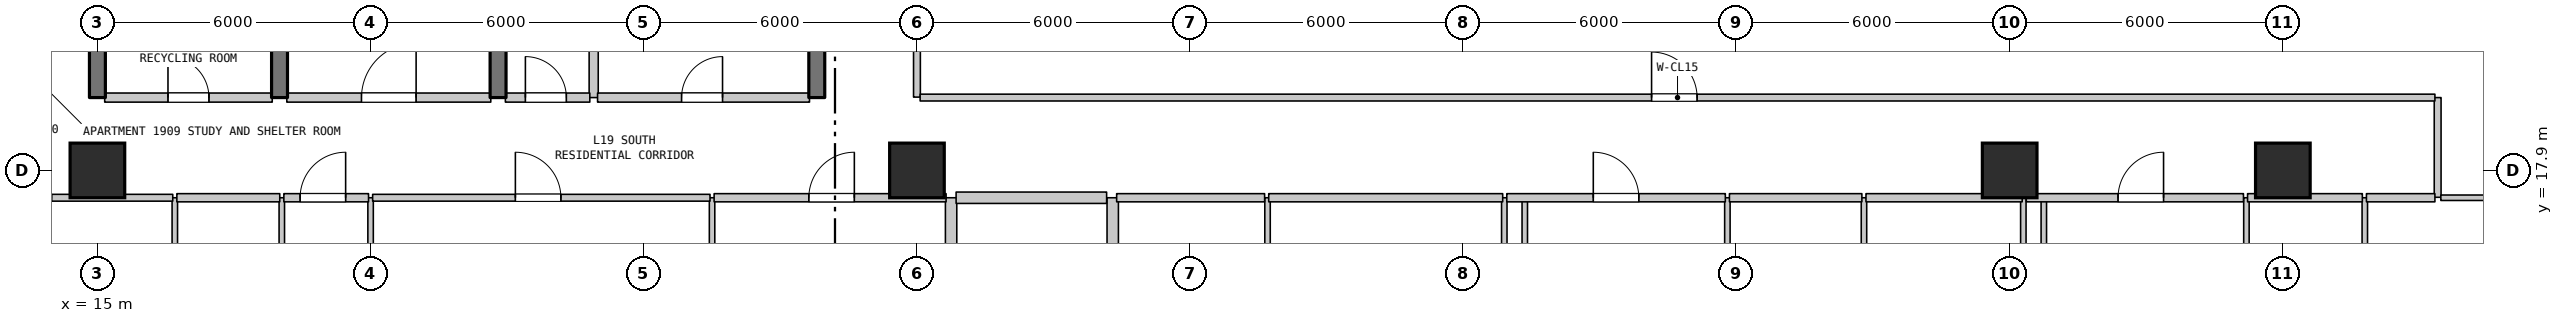
"""IFC4 building model, lengths in metres.
Left out: names, types, materials, properties, quantities, classifications, styles, units other than length and angle.
Written with IfcOpenShell. Run it as: python <this file> out.ifc"""

import sys

from ifc_helpers import new_model, si_unit, direction, frame, frame_2d, origin, origin_2d, place, context, subcontext, project, spatial, rectangle, extrude, element, fill, save


model = new_model("IFC4")
c1 = context("Model", 3, precision=1e-05, world=origin(), true_north=direction((0.0, 1.0)))
c2 = subcontext(c1, "Body", "Model", "MODEL_VIEW")
j1 = project(units=[si_unit("LENGTHUNIT", "METRE"), si_unit("PLANEANGLEUNIT", "RADIAN")], contexts=[c1])
p1 = place(None, origin())
s1 = spatial("IfcSite", under=j1, at=p1, CompositionType="ELEMENT")
p2 = place(p1, origin())
s2 = spatial("IfcBuilding", under=s1, at=p2, CompositionType="ELEMENT")
p3 = place(p2, frame((0.0, 0.0, 81.2)))
s3 = spatial("IfcBuildingStorey", under=s2, at=p3, CompositionType="ELEMENT", Elevation=81.2)
for number, where, z_axis, x_axis in (
    (1, (15.0, 17.9, 0.0), (0.0, 0.0, 1.0), (1.0, 0.0, 0.0)),
    (2, (33.0, 17.9, 0.0), (0.0, 0.0, 1.0), (1.0, 0.0, 0.0)),
    (3, (57.0, 17.9, 0.0), (0.0, 0.0, 1.0), (1.0, 0.0, 0.0)),
    (4, (63.0, 17.9, 0.0), (0.0, 0.0, 1.0), (1.0, 0.0, 0.0)),
):
    element("IfcColumn", number, at=place(p3, frame(where, z_axis=z_axis, x_axis=x_axis)), inside=s3, PredefinedType="COLUMN", context=c2, shape_type="SweptSolid", body=[
        extrude(rectangle(XDim=1.2, YDim=1.2, at=origin_2d()), origin(), (0.0, 0.0, 1.0), 5.2),
    ])
p4 = place(p3, frame((15.0, 19.5, 0.0), z_axis=(0.0, 0.0, 1.0), x_axis=(0.0, 1.0, 0.0)))
e5 = element("IfcWall", 5, at=p4, inside=s3, PredefinedType="SHEAR", context=c2, shape_type="SweptSolid", body=[
    extrude(rectangle(XDim=3.2, YDim=0.35, at=frame_2d((1.6, 0.0))), origin(), (0.0, 0.0, 1.0), 4.885),
])
p5 = place(p3, frame((16.7, 14.1, 0.0), z_axis=(0.0, 0.0, 1.0), x_axis=(0.0, 1.0, 0.0)))
e6 = element("IfcWall", 6, at=p5, inside=s3, PredefinedType="PARTITIONING", context=c2, shape_type="SweptSolid", body=[
    extrude(rectangle(XDim=3.2, YDim=0.12, at=frame_2d((1.6, 0.0))), origin(), (0.0, 0.0, 1.0), 4.885),
])
p6 = place(p3, frame((19.0, 19.5, 0.0), z_axis=(0.0, 0.0, 1.0), x_axis=(0.0, 1.0, 0.0)))
e7 = element("IfcWall", 7, at=p6, inside=s3, PredefinedType="SHEAR", context=c2, shape_type="SweptSolid", body=[
    extrude(rectangle(XDim=3.2, YDim=0.35, at=frame_2d((1.6, 0.0))), origin(), (0.0, 0.0, 1.0), 4.885),
])
p7 = place(p3, frame((19.05, 14.1, 0.0), z_axis=(0.0, 0.0, 1.0), x_axis=(0.0, 1.0, 0.0)))
e8 = element("IfcWall", 8, at=p7, inside=s3, PredefinedType="PARTITIONING", context=c2, shape_type="SweptSolid", body=[
    extrude(rectangle(XDim=3.2, YDim=0.12, at=frame_2d((1.6, 0.0))), origin(), (0.0, 0.0, 1.0), 4.885),
])
p8 = place(p7, frame((1.15, 0.0, 0.0)))
e9 = element("IfcOpeningElement", 9, at=p8, cuts=e8, PredefinedType="OPENING", context=c2, shape_type="SweptSolid", body=[
    extrude(rectangle(XDim=0.9, YDim=2.15, at=frame_2d((0.45, 1.075))), frame((0.0, 0.07, 0.0), z_axis=(0.0, -1.0, 0.0), x_axis=(1.0, 0.0, 0.0)), (0.0, 0.0, 1.0), 0.14),
])
p9 = place(p3, frame((21.0, 7.931, 0.0), z_axis=(0.0, 0.0, 1.0), x_axis=(0.0, 1.0, 0.0)))
e10 = element("IfcWall", 10, at=p9, inside=s3, PredefinedType="PARTITIONING", context=c2, shape_type="SweptSolid", body=[
    extrude(rectangle(XDim=9.369, YDim=0.12, at=frame_2d((4.685, 0.0))), origin(), (0.0, 0.0, 1.0), 4.885),
])
p10 = place(p3, frame((23.8, 19.5, 0.0), z_axis=(0.0, 0.0, 1.0), x_axis=(0.0, 1.0, 0.0)))
e11 = element("IfcWall", 11, at=p10, inside=s3, PredefinedType="SHEAR", context=c2, shape_type="SweptSolid", body=[
    extrude(rectangle(XDim=3.2, YDim=0.35, at=frame_2d((1.6, 0.0))), origin(), (0.0, 0.0, 1.0), 4.885),
])
p11 = place(p3, frame((25.9, 19.5, 0.0), z_axis=(0.0, 0.0, 1.0), x_axis=(0.0, 1.0, 0.0)))
e12 = element("IfcWall", 12, at=p11, inside=s3, PredefinedType="STANDARD", context=c2, shape_type="SweptSolid", body=[
    extrude(rectangle(XDim=3.2, YDim=0.2, at=frame_2d((1.6, 0.0))), origin(), (0.0, 0.0, 1.0), 4.885),
])
p12 = place(p3, frame((28.5, 14.95, 0.0), z_axis=(0.0, 0.0, 1.0), x_axis=(0.0, 1.0, 0.0)))
e13 = element("IfcWall", 13, at=p12, inside=s3, PredefinedType="PARTITIONING", context=c2, shape_type="SweptSolid", body=[
    extrude(rectangle(XDim=2.35, YDim=0.12, at=frame_2d((1.175, 0.0))), origin(), (0.0, 0.0, 1.0), 4.885),
])
p13 = place(p3, frame((30.8, 19.5, 0.0), z_axis=(0.0, 0.0, 1.0), x_axis=(0.0, 1.0, 0.0)))
e14 = element("IfcWall", 14, at=p13, inside=s3, PredefinedType="SHEAR", context=c2, shape_type="SweptSolid", body=[
    extrude(rectangle(XDim=3.2, YDim=0.35, at=frame_2d((1.6, 0.0))), origin(), (0.0, 0.0, 1.0), 4.885),
])
p14 = place(p3, frame((33.0, 19.51, 0.0), z_axis=(0.0, 0.0, 1.0), x_axis=(0.0, 1.0, 0.0)))
e15 = element("IfcWall", 15, at=p14, inside=s3, PredefinedType="STANDARD", context=c2, shape_type="SweptSolid", body=[
    extrude(rectangle(XDim=6.18, YDim=0.15, at=frame_2d((3.09, 0.0))), origin(), (0.0, 0.0, 1.0), 4.435),
])
for number, where, z_axis, x_axis in (
    (16, (33.75, 11.15, 0.0), (0.0, 0.0, 1.0), (0.0, 1.0, 0.0)),
    (17, (37.3, 11.15, 0.0), (0.0, 0.0, 1.0), (0.0, 1.0, 0.0)),
):
    element("IfcWall", number, at=place(p3, frame(where, z_axis=z_axis, x_axis=x_axis)), inside=s3, PredefinedType="STANDARD", context=c2, shape_type="SweptSolid", body=[
        extrude(rectangle(XDim=6.15, YDim=0.25, at=frame_2d((3.075, 0.0))), origin(), (0.0, 0.0, 1.0), 4.885),
    ])
for number, where, z_axis, x_axis in (
    (18, (40.7, 11.15, 0.0), (0.0, 0.0, 1.0), (0.0, 1.0, 0.0)),
    (19, (45.9, 11.15, 0.0), (0.0, 0.0, 1.0), (0.0, 1.0, 0.0)),
):
    element("IfcWall", number, at=place(p3, frame(where, z_axis=z_axis, x_axis=x_axis)), inside=s3, PredefinedType="PARTITIONING", context=c2, shape_type="SweptSolid", body=[
        extrude(rectangle(XDim=6.15, YDim=0.12, at=frame_2d((3.075, 0.0))), origin(), (0.0, 0.0, 1.0), 4.885),
    ])
p15 = place(p3, frame((46.35, 0.71, 0.0), z_axis=(0.0, 0.0, 1.0), x_axis=(0.0, 1.0, 0.0)))
e20 = element("IfcWall", 20, at=p15, inside=s3, PredefinedType="PARTITIONING", context=c2, shape_type="SweptSolid", body=[
    extrude(rectangle(XDim=16.59, YDim=0.12, at=frame_2d((8.295, 0.0))), origin(), (0.0, 0.0, 1.0), 4.885),
])
for number, where, z_axis, x_axis in (
    (21, (50.8, 11.15, 0.0), (0.0, 0.0, 1.0), (0.0, 1.0, 0.0)),
    (22, (53.8, 11.15, 0.0), (0.0, 0.0, 1.0), (0.0, 1.0, 0.0)),
    (23, (57.3, 11.15, 0.0), (0.0, 0.0, 1.0), (0.0, 1.0, 0.0)),
):
    element("IfcWall", number, at=place(p3, frame(where, z_axis=z_axis, x_axis=x_axis)), inside=s3, PredefinedType="PARTITIONING", context=c2, shape_type="SweptSolid", body=[
        extrude(rectangle(XDim=6.15, YDim=0.12, at=frame_2d((3.075, 0.0))), origin(), (0.0, 0.0, 1.0), 4.885),
    ])
p16 = place(p3, frame((57.75, 0.859, 0.0), z_axis=(0.0, 0.0, 1.0), x_axis=(0.0, 1.0, 0.0)))
e24 = element("IfcWall", 24, at=p16, inside=s3, PredefinedType="PARTITIONING", context=c2, shape_type="SweptSolid", body=[
    extrude(rectangle(XDim=16.441, YDim=0.12, at=frame_2d((8.221, 0.0))), origin(), (0.0, 0.0, 1.0), 4.885),
])
for number, where, z_axis, x_axis in (
    (25, (62.2, 11.15, 0.0), (0.0, 0.0, 1.0), (0.0, 1.0, 0.0)),
    (26, (64.8, 11.15, 0.0), (0.0, 0.0, 1.0), (0.0, 1.0, 0.0)),
):
    element("IfcWall", number, at=place(p3, frame(where, z_axis=z_axis, x_axis=x_axis)), inside=s3, PredefinedType="PARTITIONING", context=c2, shape_type="SweptSolid", body=[
        extrude(rectangle(XDim=6.15, YDim=0.12, at=frame_2d((3.075, 0.0))), origin(), (0.0, 0.0, 1.0), 4.885),
    ])
p17 = place(p3, frame((66.4, 17.31, 0.0), z_axis=(0.0, 0.0, 1.0), x_axis=(0.0, 1.0, 0.0)))
e27 = element("IfcWall", 27, at=p17, inside=s3, PredefinedType="STANDARD", context=c2, shape_type="SweptSolid", body=[
    extrude(rectangle(XDim=2.19, YDim=0.15, at=frame_2d((1.095, 0.0))), origin(), (0.0, 0.0, 1.0), 4.885),
])
p18 = place(p3, frame((12.875, 17.3, 0.0), z_axis=(0.0, 0.0, 1.0), x_axis=(1.0, 0.0, 0.0)))
e28 = element("IfcWall", 28, at=p18, inside=s3, PredefinedType="STANDARD", context=c2, shape_type="SweptSolid", body=[
    extrude(rectangle(XDim=3.78, YDim=0.15, at=frame_2d((1.89, 0.0))), origin(), (0.0, 0.0, 1.0), 4.885),
])
p19 = place(p18, frame((0.12, 0.0, 0.0)))
e29 = element("IfcOpeningElement", 29, at=p19, cuts=e28, PredefinedType="OPENING", context=c2, shape_type="SweptSolid", body=[
    extrude(rectangle(XDim=1.0, YDim=2.15, at=frame_2d((0.5, 1.075))), frame((0.0, 0.085, 0.0), z_axis=(0.0, -1.0, 0.0), x_axis=(1.0, 0.0, 0.0)), (0.0, 0.0, 1.0), 0.17),
])
p20 = place(p3, frame((16.745, 17.3, 0.0), z_axis=(0.0, 0.0, 1.0), x_axis=(1.0, 0.0, 0.0)))
e30 = element("IfcWall", 30, at=p20, inside=s3, PredefinedType="STANDARD", context=c2, shape_type="SweptSolid", body=[
    extrude(rectangle(XDim=2.26, YDim=0.18, at=frame_2d((1.13, 0.0))), origin(), (0.0, 0.0, 1.0), 4.885),
])
p21 = place(p3, frame((19.095, 17.3, 0.0), z_axis=(0.0, 0.0, 1.0), x_axis=(1.0, 0.0, 0.0)))
e31 = element("IfcWall", 31, at=p21, inside=s3, PredefinedType="STANDARD", context=c2, shape_type="SweptSolid", body=[
    extrude(rectangle(XDim=1.86, YDim=0.18, at=frame_2d((0.93, 0.0))), origin(), (0.0, 0.0, 1.0), 4.885),
])
p22 = place(p21, frame((0.357, 0.0, 0.0)))
e32 = element("IfcOpeningElement", 32, at=p22, cuts=e31, PredefinedType="OPENING", context=c2, shape_type="SweptSolid", body=[
    extrude(rectangle(XDim=1.0, YDim=2.15, at=frame_2d((0.5, 1.075))), frame((0.0, 0.1, 0.0), z_axis=(0.0, -1.0, 0.0), x_axis=(1.0, 0.0, 0.0)), (0.0, 0.0, 1.0), 0.2),
])
p23 = place(p3, frame((21.045, 17.3, 0.0), z_axis=(0.0, 0.0, 1.0), x_axis=(1.0, 0.0, 0.0)))
e33 = element("IfcWall", 33, at=p23, inside=s3, PredefinedType="STANDARD", context=c2, shape_type="SweptSolid", body=[
    extrude(rectangle(XDim=7.41, YDim=0.15, at=frame_2d((3.705, 0.0))), origin(), (0.0, 0.0, 1.0), 4.885),
])
p24 = place(p23, frame((3.135, 0.0, 0.0)))
e34 = element("IfcOpeningElement", 34, at=p24, cuts=e33, PredefinedType="OPENING", context=c2, shape_type="SweptSolid", body=[
    extrude(rectangle(XDim=1.0, YDim=2.15, at=frame_2d((0.5, 1.075))), frame((0.0, 0.085, 0.0), z_axis=(0.0, -1.0, 0.0), x_axis=(1.0, 0.0, 0.0)), (0.0, 0.0, 1.0), 0.17),
])
p25 = place(p3, frame((28.545, 17.3, 0.0), z_axis=(0.0, 0.0, 1.0), x_axis=(1.0, 0.0, 0.0)))
e35 = element("IfcWall", 35, at=p25, inside=s3, PredefinedType="STANDARD", context=c2, shape_type="SweptSolid", body=[
    extrude(rectangle(XDim=5.095, YDim=0.18, at=frame_2d((2.547, 0.0))), origin(), (0.0, 0.0, 1.0), 4.885),
])
p26 = place(p25, frame((2.08, 0.0, 0.0)))
e36 = element("IfcOpeningElement", 36, at=p26, cuts=e35, PredefinedType="OPENING", context=c2, shape_type="SweptSolid", body=[
    extrude(rectangle(XDim=1.0, YDim=2.15, at=frame_2d((0.5, 1.075))), frame((0.0, 0.1, 0.0), z_axis=(0.0, -1.0, 0.0), x_axis=(1.0, 0.0, 0.0)), (0.0, 0.0, 1.0), 0.2),
])
p27 = place(p3, frame((33.86, 17.3, 0.0), z_axis=(0.0, 0.0, 1.0), x_axis=(1.0, 0.0, 0.0)))
e37 = element("IfcWall", 37, at=p27, inside=s3, PredefinedType="STANDARD", context=c2, shape_type="SweptSolid", body=[
    extrude(rectangle(XDim=3.306, YDim=0.25, at=frame_2d((1.653, 0.0))), origin(), (0.0, 0.0, 1.0), 4.885),
])
p28 = place(p3, frame((37.386, 17.3, 0.0), z_axis=(0.0, 0.0, 1.0), x_axis=(1.0, 0.0, 0.0)))
e38 = element("IfcWall", 38, at=p28, inside=s3, PredefinedType="STANDARD", context=c2, shape_type="SweptSolid", body=[
    extrude(rectangle(XDim=3.25, YDim=0.18, at=frame_2d((1.625, 0.0))), origin(), (0.0, 0.0, 1.0), 4.885),
])
p29 = place(p3, frame((40.726, 17.3, 0.0), z_axis=(0.0, 0.0, 1.0), x_axis=(1.0, 0.0, 0.0)))
e39 = element("IfcWall", 39, at=p29, inside=s3, PredefinedType="STANDARD", context=c2, shape_type="SweptSolid", body=[
    extrude(rectangle(XDim=5.139, YDim=0.18, at=frame_2d((2.569, 0.0))), origin(), (0.0, 0.0, 1.0), 4.885),
])
p30 = place(p3, frame((45.955, 17.3, 0.0), z_axis=(0.0, 0.0, 1.0), x_axis=(1.0, 0.0, 0.0)))
e40 = element("IfcWall", 40, at=p30, inside=s3, PredefinedType="STANDARD", context=c2, shape_type="SweptSolid", body=[
    extrude(rectangle(XDim=4.8, YDim=0.18, at=frame_2d((2.4, 0.0))), origin(), (0.0, 0.0, 1.0), 4.885),
])
p31 = place(p30, frame((1.9, 0.0, 0.0)))
e41 = element("IfcOpeningElement", 41, at=p31, cuts=e40, PredefinedType="OPENING", context=c2, shape_type="SweptSolid", body=[
    extrude(rectangle(XDim=1.0, YDim=2.15, at=frame_2d((0.5, 1.075))), frame((0.0, 0.1, 0.0), z_axis=(0.0, -1.0, 0.0), x_axis=(1.0, 0.0, 0.0)), (0.0, 0.0, 1.0), 0.2),
])
p32 = place(p3, frame((50.845, 17.3, 0.0), z_axis=(0.0, 0.0, 1.0), x_axis=(1.0, 0.0, 0.0)))
e42 = element("IfcWall", 42, at=p32, inside=s3, PredefinedType="STANDARD", context=c2, shape_type="SweptSolid", body=[
    extrude(rectangle(XDim=2.909, YDim=0.18, at=frame_2d((1.455, 0.0))), origin(), (0.0, 0.0, 1.0), 4.885),
])
p33 = place(p3, frame((53.844, 17.3, 0.0), z_axis=(0.0, 0.0, 1.0), x_axis=(1.0, 0.0, 0.0)))
e43 = element("IfcWall", 43, at=p33, inside=s3, PredefinedType="STANDARD", context=c2, shape_type="SweptSolid", body=[
    extrude(rectangle(XDim=3.431, YDim=0.18, at=frame_2d((1.715, 0.0))), origin(), (0.0, 0.0, 1.0), 4.885),
])
p34 = place(p3, frame((57.365, 17.3, 0.0), z_axis=(0.0, 0.0, 1.0), x_axis=(1.0, 0.0, 0.0)))
e44 = element("IfcWall", 44, at=p34, inside=s3, PredefinedType="STANDARD", context=c2, shape_type="SweptSolid", body=[
    extrude(rectangle(XDim=4.77, YDim=0.18, at=frame_2d((2.385, 0.0))), origin(), (0.0, 0.0, 1.0), 4.885),
])
p35 = place(p34, frame((2.015, 0.0, 0.0)))
e45 = element("IfcOpeningElement", 45, at=p35, cuts=e44, PredefinedType="OPENING", context=c2, shape_type="SweptSolid", body=[
    extrude(rectangle(XDim=1.0, YDim=2.15, at=frame_2d((0.5, 1.075))), frame((0.0, 0.1, 0.0), z_axis=(0.0, -1.0, 0.0), x_axis=(1.0, 0.0, 0.0)), (0.0, 0.0, 1.0), 0.2),
])
p36 = place(p3, frame((62.225, 17.3, 0.0), z_axis=(0.0, 0.0, 1.0), x_axis=(1.0, 0.0, 0.0)))
e46 = element("IfcWall", 46, at=p36, inside=s3, PredefinedType="STANDARD", context=c2, shape_type="SweptSolid", body=[
    extrude(rectangle(XDim=2.521, YDim=0.18, at=frame_2d((1.26, 0.0))), origin(), (0.0, 0.0, 1.0), 4.885),
])
p37 = place(p3, frame((64.836, 17.3, 0.0), z_axis=(0.0, 0.0, 1.0), x_axis=(1.0, 0.0, 0.0)))
e47 = element("IfcWall", 47, at=p37, inside=s3, PredefinedType="STANDARD", context=c2, shape_type="SweptSolid", body=[
    extrude(rectangle(XDim=1.504, YDim=0.18, at=frame_2d((0.752, 0.0))), origin(), (0.0, 0.0, 1.0), 4.885),
])
p38 = place(p3, frame((66.47, 17.3, 0.0), z_axis=(0.0, 0.0, 1.0), x_axis=(1.0, 0.0, 0.0)))
e48 = element("IfcWall", 48, at=p38, inside=s3, PredefinedType="PARTITIONING", context=c2, shape_type="SweptSolid", body=[
    extrude(rectangle(XDim=1.341, YDim=0.12, at=frame_2d((0.67, 0.0))), origin(), (0.0, 0.0, 1.0), 4.885),
])
p39 = place(p3, frame((15.16, 19.5, 0.0), z_axis=(0.0, 0.0, 1.0), x_axis=(1.0, 0.0, 0.0)))
e49 = element("IfcWall", 49, at=p39, inside=s3, PredefinedType="STANDARD", context=c2, shape_type="SweptSolid", body=[
    extrude(rectangle(XDim=3.68, YDim=0.2, at=frame_2d((1.84, 0.0))), origin(), (0.0, 0.0, 1.0), 4.885),
])
p40 = place(p39, frame((1.39, 0.0, 0.0)))
e50 = element("IfcOpeningElement", 50, at=p40, cuts=e49, PredefinedType="OPENING", context=c2, shape_type="SweptSolid", body=[
    extrude(rectangle(XDim=0.9, YDim=2.15, at=frame_2d((0.45, 1.075))), frame((0.0, 0.11, 0.0), z_axis=(0.0, -1.0, 0.0), x_axis=(1.0, 0.0, 0.0)), (0.0, 0.0, 1.0), 0.22),
])
p41 = place(p3, frame((19.16, 19.5, 0.0), z_axis=(0.0, 0.0, 1.0), x_axis=(1.0, 0.0, 0.0)))
e51 = element("IfcWall", 51, at=p41, inside=s3, PredefinedType="STANDARD", context=c2, shape_type="SweptSolid", body=[
    extrude(rectangle(XDim=4.48, YDim=0.2, at=frame_2d((2.24, 0.0))), origin(), (0.0, 0.0, 1.0), 4.885),
])
p42 = place(p41, frame((1.64, 0.0, 0.0)))
e52 = element("IfcOpeningElement", 52, at=p42, cuts=e51, PredefinedType="OPENING", context=c2, shape_type="SweptSolid", body=[
    extrude(rectangle(XDim=1.2, YDim=2.2, at=frame_2d((0.6, 1.1))), frame((0.0, 0.11, 0.0), z_axis=(0.0, -1.0, 0.0), x_axis=(1.0, 0.0, 0.0)), (0.0, 0.0, 1.0), 0.22),
])
p43 = place(p3, frame((23.96, 19.5, 0.0), z_axis=(0.0, 0.0, 1.0), x_axis=(1.0, 0.0, 0.0)))
e53 = element("IfcWall", 53, at=p43, inside=s3, PredefinedType="STANDARD", context=c2, shape_type="SweptSolid", body=[
    extrude(rectangle(XDim=1.855, YDim=0.2, at=frame_2d((0.927, 0.0))), origin(), (0.0, 0.0, 1.0), 4.885),
])
p44 = place(p43, frame((0.44, 0.0, 0.0)))
e54 = element("IfcOpeningElement", 54, at=p44, cuts=e53, PredefinedType="OPENING", context=c2, shape_type="SweptSolid", body=[
    extrude(rectangle(XDim=0.9, YDim=2.15, at=frame_2d((0.45, 1.075))), frame((0.0, 0.11, 0.0), z_axis=(0.0, -1.0, 0.0), x_axis=(1.0, 0.0, 0.0)), (0.0, 0.0, 1.0), 0.22),
])
p45 = place(p3, frame((25.985, 19.5, 0.0), z_axis=(0.0, 0.0, 1.0), x_axis=(1.0, 0.0, 0.0)))
e55 = element("IfcWall", 55, at=p45, inside=s3, PredefinedType="STANDARD", context=c2, shape_type="SweptSolid", body=[
    extrude(rectangle(XDim=4.655, YDim=0.2, at=frame_2d((2.327, 0.0))), origin(), (0.0, 0.0, 1.0), 4.885),
])
p46 = place(p45, frame((1.845, 0.0, 0.0)))
e56 = element("IfcOpeningElement", 56, at=p46, cuts=e55, PredefinedType="OPENING", context=c2, shape_type="SweptSolid", body=[
    extrude(rectangle(XDim=0.9, YDim=2.15, at=frame_2d((0.45, 1.075))), frame((0.0, 0.11, 0.0), z_axis=(0.0, -1.0, 0.0), x_axis=(1.0, 0.0, 0.0)), (0.0, 0.0, 1.0), 0.22),
])
p47 = place(p3, frame((33.07, 19.5, 0.0), z_axis=(0.0, 0.0, 1.0), x_axis=(1.0, 0.0, 0.0)))
e57 = element("IfcWall", 57, at=p47, inside=s3, PredefinedType="STANDARD", context=c2, shape_type="SweptSolid", body=[
    extrude(rectangle(XDim=33.27, YDim=0.15, at=frame_2d((16.635, 0.0))), origin(), (0.0, 0.0, 1.0), 4.885),
])
p48 = place(p47, frame((16.065, 0.0, 0.0)))
e58 = element("IfcOpeningElement", 58, at=p48, cuts=e57, PredefinedType="OPENING", context=c2, shape_type="SweptSolid", body=[
    extrude(rectangle(XDim=1.0, YDim=2.15, at=frame_2d((0.5, 1.075))), frame((0.0, 0.085, 0.0), z_axis=(0.0, -1.0, 0.0), x_axis=(1.0, 0.0, 0.0)), (0.0, 0.0, 1.0), 0.17),
])
p49 = place(p22, origin())
e59 = element("IfcDoor", 59, at=p49, inside=s3, OperationType="SINGLE_SWING_RIGHT", PredefinedType="DOOR", context=c2, shape_type="SweptSolid", body=[
    extrude(rectangle(XDim=1.0, YDim=2.15, at=frame_2d((0.5, 1.075))), frame((0.0, 0.025, 0.0), z_axis=(0.0, -1.0, 0.0), x_axis=(1.0, 0.0, 0.0)), (0.0, 0.0, 1.0), 0.05),
])
fill(e32, e59)
p50 = place(p24, origin())
e60 = element("IfcDoor", 60, at=p50, inside=s3, OperationType="SINGLE_SWING_LEFT", PredefinedType="DOOR", context=c2, shape_type="SweptSolid", body=[
    extrude(rectangle(XDim=1.0, YDim=2.15, at=frame_2d((0.5, 1.075))), frame((0.0, 0.025, 0.0), z_axis=(0.0, -1.0, 0.0), x_axis=(1.0, 0.0, 0.0)), (0.0, 0.0, 1.0), 0.05),
])
fill(e34, e60)
p51 = place(p26, origin())
e61 = element("IfcDoor", 61, at=p51, inside=s3, OperationType="SINGLE_SWING_RIGHT", PredefinedType="DOOR", context=c2, shape_type="SweptSolid", body=[
    extrude(rectangle(XDim=1.0, YDim=2.15, at=frame_2d((0.5, 1.075))), frame((0.0, 0.025, 0.0), z_axis=(0.0, -1.0, 0.0), x_axis=(1.0, 0.0, 0.0)), (0.0, 0.0, 1.0), 0.05),
])
fill(e36, e61)
p52 = place(p31, origin())
e62 = element("IfcDoor", 62, at=p52, inside=s3, OperationType="SINGLE_SWING_LEFT", PredefinedType="DOOR", context=c2, shape_type="SweptSolid", body=[
    extrude(rectangle(XDim=1.0, YDim=2.15, at=frame_2d((0.5, 1.075))), frame((0.0, 0.025, 0.0), z_axis=(0.0, -1.0, 0.0), x_axis=(1.0, 0.0, 0.0)), (0.0, 0.0, 1.0), 0.05),
])
fill(e41, e62)
p53 = place(p35, origin())
e63 = element("IfcDoor", 63, at=p53, inside=s3, OperationType="SINGLE_SWING_RIGHT", PredefinedType="DOOR", context=c2, shape_type="SweptSolid", body=[
    extrude(rectangle(XDim=1.0, YDim=2.15, at=frame_2d((0.5, 1.075))), frame((0.0, 0.025, 0.0), z_axis=(0.0, -1.0, 0.0), x_axis=(1.0, 0.0, 0.0)), (0.0, 0.0, 1.0), 0.05),
])
fill(e45, e63)
p54 = place(p40, origin())
e64 = element("IfcDoor", 64, at=p54, inside=s3, OperationType="SINGLE_SWING_LEFT", PredefinedType="DOOR", context=c2, shape_type="SweptSolid", body=[
    extrude(rectangle(XDim=0.9, YDim=2.15, at=frame_2d((0.45, 1.075))), frame((0.0, 0.025, 0.0), z_axis=(0.0, -1.0, 0.0), x_axis=(1.0, 0.0, 0.0)), (0.0, 0.0, 1.0), 0.05),
])
fill(e50, e64)
p55 = place(p42, origin())
e65 = element("IfcDoor", 65, at=p55, inside=s3, OperationType="SINGLE_SWING_RIGHT", PredefinedType="DOOR", context=c2, shape_type="SweptSolid", body=[
    extrude(rectangle(XDim=1.2, YDim=2.2, at=frame_2d((0.6, 1.1))), frame((0.0, 0.025, 0.0), z_axis=(0.0, -1.0, 0.0), x_axis=(1.0, 0.0, 0.0)), (0.0, 0.0, 1.0), 0.05),
])
fill(e52, e65)
p56 = place(p44, origin())
e66 = element("IfcDoor", 66, at=p56, inside=s3, OperationType="SINGLE_SWING_LEFT", PredefinedType="DOOR", context=c2, shape_type="SweptSolid", body=[
    extrude(rectangle(XDim=0.9, YDim=2.15, at=frame_2d((0.45, 1.075))), frame((0.0, 0.025, 0.0), z_axis=(0.0, -1.0, 0.0), x_axis=(1.0, 0.0, 0.0)), (0.0, 0.0, 1.0), 0.05),
])
fill(e54, e66)
p57 = place(p46, origin())
e67 = element("IfcDoor", 67, at=p57, inside=s3, OperationType="SINGLE_SWING_RIGHT", PredefinedType="DOOR", context=c2, shape_type="SweptSolid", body=[
    extrude(rectangle(XDim=0.9, YDim=2.15, at=frame_2d((0.45, 1.075))), frame((0.0, 0.025, 0.0), z_axis=(0.0, -1.0, 0.0), x_axis=(1.0, 0.0, 0.0)), (0.0, 0.0, 1.0), 0.05),
])
fill(e56, e67)
p58 = place(p48, origin())
e68 = element("IfcDoor", 68, at=p58, inside=s3, OperationType="SINGLE_SWING_LEFT", PredefinedType="DOOR", context=c2, shape_type="SweptSolid", body=[
    extrude(rectangle(XDim=1.0, YDim=2.15, at=frame_2d((0.5, 1.075))), frame((0.0, 0.025, 0.0), z_axis=(0.0, -1.0, 0.0), x_axis=(1.0, 0.0, 0.0)), (0.0, 0.0, 1.0), 0.05),
])
fill(e58, e68)
save(model, sys.argv[1])
